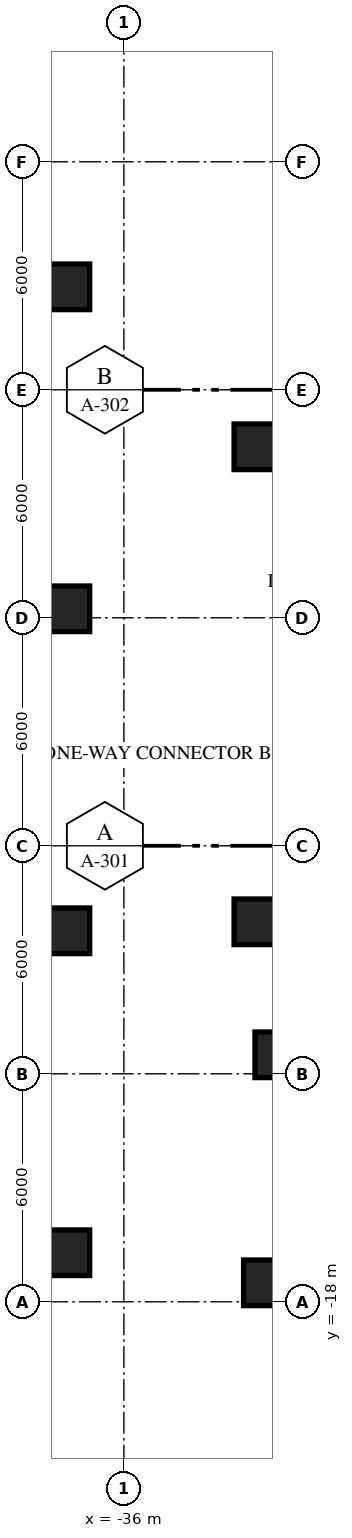
"""IFC4 building model, lengths in metres.
Left out: names, types, materials, properties, quantities, classifications, styles, units other than length and angle.
Written with IfcOpenShell. Run it as: python <this file> out.ifc"""

import sys

from ifc_helpers import new_model, si_unit, direction, frame, origin, origin_2d, place, context, subcontext, project, spatial, rectangle, extrude, element, save


model = new_model("IFC4")
c1 = context("Model", 3, precision=1e-05, world=origin(), true_north=direction((0.0, 1.0)))
c2 = subcontext(c1, "Body", "Model", "MODEL_VIEW")
j1 = project(units=[si_unit("LENGTHUNIT", "METRE"), si_unit("PLANEANGLEUNIT", "RADIAN")], contexts=[c1])
p1 = place(None, origin())
s1 = spatial("IfcSite", under=j1, at=p1, CompositionType="ELEMENT")
p2 = place(p1, origin())
s2 = spatial("IfcBuilding", under=s1, at=p2, CompositionType="ELEMENT")
p3 = place(p2, frame((0.0, 0.0, -4.2)))
s3 = spatial("IfcBuildingStorey", under=s2, at=p3, CompositionType="ELEMENT", Elevation=-4.2)
for number, where, z_axis, x_axis in (
    (1, (-32.25, -17.5, 0.0), (0.0, 0.0, 1.0), (1.0, 0.0, 0.0)),
    (2, (-37.5, -16.709, 0.0), (0.0, 0.0, 1.0), (1.0, 0.0, 0.0)),
    (3, (-31.95, -11.5, 0.0), (0.0, 0.0, 1.0), (1.0, 0.0, 0.0)),
    (4, (-37.5, -8.236, 0.0), (0.0, 0.0, 1.0), (1.0, 0.0, 0.0)),
    (5, (-32.5, -8.0, 0.0), (0.0, 0.0, 1.0), (1.0, 0.0, 0.0)),
    (6, (-37.5, 0.236, 0.0), (0.0, 0.0, 1.0), (1.0, 0.0, 0.0)),
    (7, (-32.5, 4.5, 0.0), (0.0, 0.0, 1.0), (1.0, 0.0, 0.0)),
    (8, (-37.5, 8.709, 0.0), (0.0, 0.0, 1.0), (1.0, 0.0, 0.0)),
):
    element("IfcColumn", number, at=place(p3, frame(where, z_axis=z_axis, x_axis=x_axis)), inside=s3, PredefinedType="COLUMN", context=c2, shape_type="SweptSolid", body=[
        extrude(rectangle(XDim=1.2, YDim=1.2, at=origin_2d()), origin(), (0.0, 0.0, 1.0), 4.2),
    ])
save(model, sys.argv[1])
